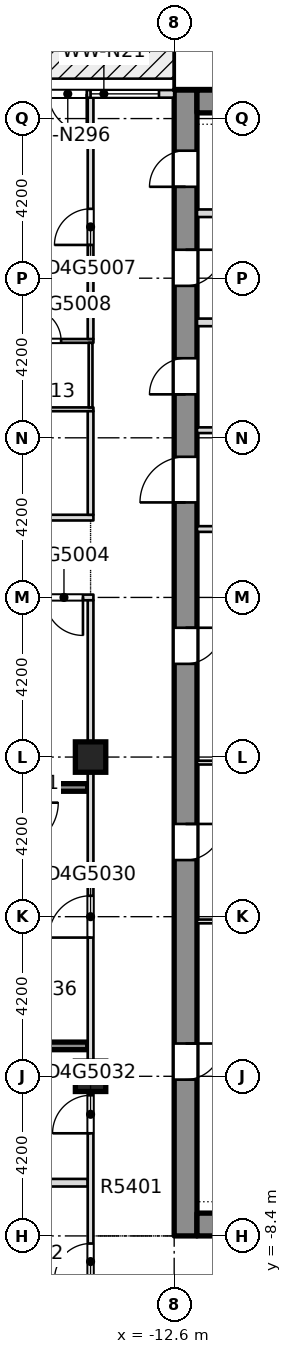
"""IFC4 building model, lengths in metres.
Left out: names, types, materials, properties, quantities, classifications, styles, units other than length and angle.
Written with IfcOpenShell. Run it as: python <this file> out.ifc"""

import sys

from ifc_helpers import new_model, si_unit, direction, frame, frame_2d, origin, origin_2d, place, context, subcontext, project, spatial, rectangle, extrude, element, fill, save


model = new_model("IFC4")
c1 = context("Model", 3, precision=1e-05, world=origin(), true_north=direction((0.0, 1.0)))
c2 = subcontext(c1, "Body", "Model", "MODEL_VIEW")
j1 = project(units=[si_unit("LENGTHUNIT", "METRE"), si_unit("PLANEANGLEUNIT", "RADIAN")], contexts=[c1])
p1 = place(None, origin())
s1 = spatial("IfcSite", under=j1, at=p1, CompositionType="ELEMENT")
p2 = place(p1, origin())
s2 = spatial("IfcBuilding", under=s1, at=p2, CompositionType="ELEMENT")
p3 = place(p2, frame((0.0, 0.0, 206.6)))
s3 = spatial("IfcBuildingStorey", under=s2, at=p3, CompositionType="ELEMENT", Elevation=206.6)
p4 = place(p3, frame((-12.3, -8.4, -0.4), z_axis=(0.0, 0.0, 1.0), x_axis=(0.0, 1.0, 0.0)))
e1 = element("IfcWall", 1, at=p4, inside=s3, PredefinedType="SHEAR", context=c2, shape_type="SweptSolid", body=[
    extrude(rectangle(XDim=30.15, YDim=0.6, at=frame_2d((15.075, 0.0))), origin(), (0.0, 0.0, 1.0), 3.45),
])
p5 = place(p4, frame((4.113, 0.0, 0.4)))
e2 = element("IfcOpeningElement", 2, at=p5, cuts=e1, PredefinedType="OPENING", context=c2, shape_type="SweptSolid", body=[
    extrude(rectangle(XDim=0.95, YDim=2.1, at=frame_2d((0.475, 1.05))), frame((0.0, 0.31, 0.0), z_axis=(0.0, -1.0, 0.0), x_axis=(1.0, 0.0, 0.0)), (0.0, 0.0, 1.0), 0.62),
])
p6 = place(p4, frame((9.89, 0.0, 0.4)))
e3 = element("IfcOpeningElement", 3, at=p6, cuts=e1, PredefinedType="OPENING", context=c2, shape_type="SweptSolid", body=[
    extrude(rectangle(XDim=0.95, YDim=2.1, at=frame_2d((0.475, 1.05))), frame((0.0, 0.31, 0.0), z_axis=(0.0, -1.0, 0.0), x_axis=(1.0, 0.0, 0.0)), (0.0, 0.0, 1.0), 0.62),
])
p7 = place(p4, frame((15.052, 0.0, 0.4)))
e4 = element("IfcOpeningElement", 4, at=p7, cuts=e1, PredefinedType="OPENING", context=c2, shape_type="SweptSolid", body=[
    extrude(rectangle(XDim=0.95, YDim=2.1, at=frame_2d((0.475, 1.05))), frame((0.0, 0.31, 0.0), z_axis=(0.0, -1.0, 0.0), x_axis=(1.0, 0.0, 0.0)), (0.0, 0.0, 1.0), 0.62),
])
p8 = place(p4, frame((22.144, 0.0, 0.4)))
e5 = element("IfcOpeningElement", 5, at=p8, cuts=e1, PredefinedType="OPENING", context=c2, shape_type="SweptSolid", body=[
    extrude(rectangle(XDim=0.95, YDim=2.1, at=frame_2d((0.475, 1.05))), frame((0.0, 0.31, 0.0), z_axis=(0.0, -1.0, 0.0), x_axis=(1.0, 0.0, 0.0)), (0.0, 0.0, 1.0), 0.62),
])
p9 = place(p4, frame((24.998, 0.0, 0.4)))
e6 = element("IfcOpeningElement", 6, at=p9, cuts=e1, PredefinedType="OPENING", context=c2, shape_type="SweptSolid", body=[
    extrude(rectangle(XDim=0.95, YDim=2.1, at=frame_2d((0.475, 1.05))), frame((0.0, 0.31, 0.0), z_axis=(0.0, -1.0, 0.0), x_axis=(1.0, 0.0, 0.0)), (0.0, 0.0, 1.0), 0.62),
])
p10 = place(p4, frame((27.605, 0.0, 0.4)))
e7 = element("IfcOpeningElement", 7, at=p10, cuts=e1, PredefinedType="OPENING", context=c2, shape_type="SweptSolid", body=[
    extrude(rectangle(XDim=0.95, YDim=2.1, at=frame_2d((0.475, 1.05))), frame((0.0, 0.31, 0.0), z_axis=(0.0, -1.0, 0.0), x_axis=(1.0, 0.0, 0.0)), (0.0, 0.0, 1.0), 0.62),
])
p11 = place(p4, frame((19.3, 0.0, 0.4)))
e8 = element("IfcOpeningElement", 8, at=p11, cuts=e1, PredefinedType="OPENING", context=c2, shape_type="SweptSolid", body=[
    extrude(rectangle(XDim=1.2, YDim=2.1, at=frame_2d((0.6, 1.05))), frame((0.0, 0.31, 0.0), z_axis=(0.0, -1.0, 0.0), x_axis=(1.0, 0.0, 0.0)), (0.0, 0.0, 1.0), 0.62),
])
p12 = place(p3, frame((-12.0, -8.1, -0.4), z_axis=(0.0, 0.0, 1.0), x_axis=(1.0, 0.0, 0.0)))
e9 = element("IfcWall", 9, at=p12, inside=s3, PredefinedType="SHEAR", context=c2, shape_type="SweptSolid", body=[
    extrude(rectangle(XDim=24.0, YDim=0.6, at=frame_2d((12.0, 0.0))), origin(), (0.0, 0.0, 1.0), 3.45),
])
p13 = place(p12, frame((7.25, 0.0, 0.4)))
e10 = element("IfcOpeningElement", 10, at=p13, cuts=e9, PredefinedType="OPENING", context=c2, shape_type="SweptSolid", body=[
    extrude(rectangle(XDim=1.8, YDim=2.1, at=frame_2d((0.9, 1.05))), frame((0.0, 0.31, 0.0), z_axis=(0.0, -1.0, 0.0), x_axis=(1.0, 0.0, 0.0)), (0.0, 0.0, 1.0), 0.62),
])
p14 = place(p12, frame((14.95, 0.0, 0.4)))
e11 = element("IfcOpeningElement", 11, at=p14, cuts=e9, PredefinedType="OPENING", context=c2, shape_type="SweptSolid", body=[
    extrude(rectangle(XDim=1.8, YDim=2.1, at=frame_2d((0.9, 1.05))), frame((0.0, 0.31, 0.0), z_axis=(0.0, -1.0, 0.0), x_axis=(1.0, 0.0, 0.0)), (0.0, 0.0, 1.0), 0.62),
])
p15 = place(p3, frame((-12.0, 21.45, -0.4), z_axis=(0.0, 0.0, 1.0), x_axis=(1.0, 0.0, 0.0)))
e12 = element("IfcWall", 12, at=p15, inside=s3, PredefinedType="SHEAR", context=c2, shape_type="SweptSolid", body=[
    extrude(rectangle(XDim=24.0, YDim=0.6, at=frame_2d((12.0, 0.0))), origin(), (0.0, 0.0, 1.0), 3.45),
])
for number, where, z_axis, x_axis in (
    (13, (-14.8, -4.2, -0.4), (0.0, 0.0, 1.0), (1.0, 0.0, 0.0)),
    (14, (-14.8, 4.2, -0.4), (0.0, 0.0, 1.0), (1.0, 0.0, 0.0)),
):
    element("IfcColumn", number, at=place(p3, frame(where, z_axis=z_axis, x_axis=x_axis)), inside=s3, PredefinedType="COLUMN", context=c2, shape_type="SweptSolid", body=[
        extrude(rectangle(XDim=0.8, YDim=0.8, at=origin_2d()), origin(), (0.0, 0.0, 1.0), 3.45),
    ])
p16 = place(p3, frame((-25.75, -7.0, 0.0), z_axis=(0.0, 0.0, 1.0), x_axis=(1.0, 0.0, 0.0)))
e15 = element("IfcWall", 15, at=p16, inside=s3, PredefinedType="PARTITIONING", context=c2, shape_type="SweptSolid", body=[
    extrude(rectangle(XDim=10.875, YDim=0.2, at=frame_2d((5.438, 0.0))), origin(), (0.0, 0.0, 1.0), 3.05),
])
p17 = place(p3, frame((-22.4, -3.4, 0.0), z_axis=(0.0, 0.0, 1.0), x_axis=(1.0, 0.0, 0.0)))
e16 = element("IfcWall", 16, at=p17, inside=s3, PredefinedType="SOLIDWALL", context=c2, shape_type="SweptSolid", body=[
    extrude(rectangle(XDim=7.525, YDim=0.2, at=frame_2d((3.762, 0.0))), origin(), (0.0, 0.0, 1.0), 3.05),
])
p18 = place(p3, frame((-20.45, 3.4, 0.0), z_axis=(0.0, 0.0, 1.0), x_axis=(1.0, 0.0, 0.0)))
e17 = element("IfcWall", 17, at=p18, inside=s3, PredefinedType="SOLIDWALL", context=c2, shape_type="SweptSolid", body=[
    extrude(rectangle(XDim=5.575, YDim=0.2, at=frame_2d((2.788, 0.0))), origin(), (0.0, 0.0, 1.0), 3.05),
])
p19 = place(p3, frame((-25.75, 8.4, 0.0), z_axis=(0.0, 0.0, 1.0), x_axis=(1.0, 0.0, 0.0)))
e18 = element("IfcWall", 18, at=p19, inside=s3, PredefinedType="PARTITIONING", context=c2, shape_type="SweptSolid", body=[
    extrude(rectangle(XDim=11.025, YDim=0.15, at=frame_2d((5.512, 0.0))), origin(), (0.0, 0.0, 1.0), 3.05),
])
p20 = place(p19, frame((9.75, 0.0, 0.0)))
e19 = element("IfcOpeningElement", 19, at=p20, cuts=e18, PredefinedType="OPENING", context=c2, shape_type="SweptSolid", body=[
    extrude(rectangle(XDim=1.0, YDim=2.1, at=frame_2d((0.5, 1.05))), frame((0.0, 0.085, 0.0), z_axis=(0.0, -1.0, 0.0), x_axis=(1.0, 0.0, 0.0)), (0.0, 0.0, 1.0), 0.17),
])
p21 = place(p3, frame((-25.75, 10.5, 0.0), z_axis=(0.0, 0.0, 1.0), x_axis=(1.0, 0.0, 0.0)))
e20 = element("IfcWall", 20, at=p21, inside=s3, PredefinedType="PARTITIONING", context=c2, shape_type="SweptSolid", body=[
    extrude(rectangle(XDim=11.025, YDim=0.15, at=frame_2d((5.512, 0.0))), origin(), (0.0, 0.0, 1.0), 3.05),
])
p22 = place(p21, frame((4.875, 0.0, 0.0)))
e21 = element("IfcOpeningElement", 21, at=p22, cuts=e20, PredefinedType="OPENING", context=c2, shape_type="SweptSolid", body=[
    extrude(rectangle(XDim=1.0, YDim=2.1, at=frame_2d((0.5, 1.05))), frame((0.0, 0.085, 0.0), z_axis=(0.0, -1.0, 0.0), x_axis=(1.0, 0.0, 0.0)), (0.0, 0.0, 1.0), 0.17),
])
p23 = place(p3, frame((-17.25, 13.35, 0.0), z_axis=(0.0, 0.0, 1.0), x_axis=(1.0, 0.0, 0.0)))
e22 = element("IfcWall", 22, at=p23, inside=s3, PredefinedType="PARTITIONING", context=c2, shape_type="SweptSolid", body=[
    extrude(rectangle(XDim=2.525, YDim=0.1, at=frame_2d((1.262, 0.0))), origin(), (0.0, 0.0, 1.0), 3.05),
])
p24 = place(p3, frame((-17.25, 15.15, 0.0), z_axis=(0.0, 0.0, 1.0), x_axis=(1.0, 0.0, 0.0)))
e23 = element("IfcWall", 23, at=p24, inside=s3, PredefinedType="PARTITIONING", context=c2, shape_type="SweptSolid", body=[
    extrude(rectangle(XDim=2.525, YDim=0.1, at=frame_2d((1.262, 0.0))), origin(), (0.0, 0.0, 1.0), 3.05),
])
p25 = place(p24, frame((0.825, 0.0, 0.0)))
e24 = element("IfcOpeningElement", 24, at=p25, cuts=e23, PredefinedType="OPENING", context=c2, shape_type="SweptSolid", body=[
    extrude(rectangle(XDim=0.85, YDim=2.1, at=frame_2d((0.425, 1.05))), frame((0.0, 0.06, 0.0), z_axis=(0.0, -1.0, 0.0), x_axis=(1.0, 0.0, 0.0)), (0.0, 0.0, 1.0), 0.12),
])
p26 = place(p3, frame((-14.8, -9.77, 0.0), z_axis=(0.0, 0.0, 1.0), x_axis=(0.0, 1.0, 0.0)))
e25 = element("IfcWall", 25, at=p26, inside=s3, PredefinedType="PARTITIONING", context=c2, shape_type="SweptSolid", body=[
    extrude(rectangle(XDim=18.095, YDim=0.15, at=frame_2d((9.047, 0.0))), origin(), (0.0, 0.0, 1.0), 3.05),
])
p27 = place(p26, frame((0.22, 0.0, 0.0)))
e26 = element("IfcOpeningElement", 26, at=p27, cuts=e25, PredefinedType="OPENING", context=c2, shape_type="SweptSolid", body=[
    extrude(rectangle(XDim=0.95, YDim=2.1, at=frame_2d((0.475, 1.05))), frame((0.0, 0.085, 0.0), z_axis=(0.0, -1.0, 0.0), x_axis=(1.0, 0.0, 0.0)), (0.0, 0.0, 1.0), 0.17),
])
p28 = place(p26, frame((9.22, 0.0, 0.0)))
e27 = element("IfcOpeningElement", 27, at=p28, cuts=e25, PredefinedType="OPENING", context=c2, shape_type="SweptSolid", body=[
    extrude(rectangle(XDim=1.1, YDim=2.1, at=frame_2d((0.55, 1.05))), frame((0.0, 0.085, 0.0), z_axis=(0.0, -1.0, 0.0), x_axis=(1.0, 0.0, 0.0)), (0.0, 0.0, 1.0), 0.17),
])
p29 = place(p26, frame((4.07, 0.0, 0.0)))
e28 = element("IfcOpeningElement", 28, at=p29, cuts=e25, PredefinedType="OPENING", context=c2, shape_type="SweptSolid", body=[
    extrude(rectangle(XDim=1.0, YDim=2.1, at=frame_2d((0.5, 1.05))), frame((0.0, 0.085, 0.0), z_axis=(0.0, -1.0, 0.0), x_axis=(1.0, 0.0, 0.0)), (0.0, 0.0, 1.0), 0.17),
])
p30 = place(p3, frame((-14.8, 10.575, 0.0), z_axis=(0.0, 0.0, 1.0), x_axis=(0.0, 1.0, 0.0)))
e29 = element("IfcWall", 29, at=p30, inside=s3, PredefinedType="PARTITIONING", context=c2, shape_type="SweptSolid", body=[
    extrude(rectangle(XDim=2.725, YDim=0.15, at=frame_2d((1.363, 0.0))), origin(), (0.0, 0.0, 1.0), 3.05),
])
p31 = place(p3, frame((-14.8, 13.4, 0.0), z_axis=(0.0, 0.0, 1.0), x_axis=(0.0, 1.0, 0.0)))
e30 = element("IfcWall", 30, at=p31, inside=s3, PredefinedType="PARTITIONING", context=c2, shape_type="SweptSolid", body=[
    extrude(rectangle(XDim=1.7, YDim=0.1, at=frame_2d((0.85, 0.0))), origin(), (0.0, 0.0, 1.0), 3.05),
])
p32 = place(p3, frame((-14.8, 15.2, 0.0), z_axis=(0.0, 0.0, 1.0), x_axis=(0.0, 1.0, 0.0)))
e31 = element("IfcWall", 31, at=p32, inside=s3, PredefinedType="PARTITIONING", context=c2, shape_type="SweptSolid", body=[
    extrude(rectangle(XDim=6.35, YDim=0.15, at=frame_2d((3.175, 0.0))), origin(), (0.0, 0.0, 1.0), 3.05),
])
p33 = place(p32, frame((2.475, 0.0, 0.0)))
e32 = element("IfcOpeningElement", 32, at=p33, cuts=e31, PredefinedType="OPENING", context=c2, shape_type="SweptSolid", body=[
    extrude(rectangle(XDim=0.95, YDim=2.1, at=frame_2d((0.475, 1.05))), frame((0.0, 0.085, 0.0), z_axis=(0.0, -1.0, 0.0), x_axis=(1.0, 0.0, 0.0)), (0.0, 0.0, 1.0), 0.17),
])
p34 = place(p3, frame((-12.6, 21.65, 0.0), z_axis=(0.0, 0.0, 1.0), x_axis=(-1.0, 0.0, 0.0)))
e33 = element("IfcWall", 33, at=p34, inside=s3, PredefinedType="STANDARD", context=c2, shape_type="SweptSolid", body=[
    extrude(rectangle(XDim=3.7, YDim=0.2, at=frame_2d((1.85, 0.0))), origin(), (0.0, 0.0, 1.0), 3.05),
])
p35 = place(p34, frame((0.4, 0.0, 0.2)))
e34 = element("IfcOpeningElement", 34, at=p35, cuts=e33, PredefinedType="OPENING", context=c2, shape_type="SweptSolid", body=[
    extrude(rectangle(XDim=1.8, YDim=2.65, at=frame_2d((0.9, 1.325))), frame((0.0, 0.11, 0.0), z_axis=(0.0, -1.0, 0.0), x_axis=(1.0, 0.0, 0.0)), (0.0, 0.0, 1.0), 0.22),
])
p36 = place(p34, frame((2.3, 0.0, 0.0)))
e35 = element("IfcOpeningElement", 35, at=p36, cuts=e33, PredefinedType="OPENING", context=c2, shape_type="SweptSolid", body=[
    extrude(rectangle(XDim=1.0, YDim=2.4, at=frame_2d((0.5, 1.2))), frame((0.0, 0.11, 0.0), z_axis=(0.0, -1.0, 0.0), x_axis=(1.0, 0.0, 0.0)), (0.0, 0.0, 1.0), 0.22),
])
for number, where, z_axis, x_axis in (
    (36, (-11.999, -0.125, 0.0), (0.0, 0.0, 1.0), (1.0, 0.0, 0.0)),
    (37, (-11.999, 4.054, 0.0), (0.0, 0.0, 1.0), (1.0, 0.0, 0.0)),
):
    element("IfcWall", number, at=place(p3, frame(where, z_axis=z_axis, x_axis=x_axis)), inside=s3, PredefinedType="PARTITIONING", context=c2, shape_type="SweptSolid", body=[
        extrude(rectangle(XDim=3.298, YDim=0.1, at=frame_2d((1.649, 0.0))), origin(), (0.0, 0.0, 1.0), 3.05),
    ])
for number, where, z_axis, x_axis in (
    (38, (-11.999, 10.2, 0.0), (0.0, 0.0, 1.0), (1.0, 0.0, 0.0)),
    (39, (-11.999, 12.8, 0.0), (0.0, 0.0, 1.0), (1.0, 0.0, 0.0)),
):
    element("IfcWall", number, at=place(p3, frame(where, z_axis=z_axis, x_axis=x_axis)), inside=s3, PredefinedType="PARTITIONING", context=c2, shape_type="SweptSolid", body=[
        extrude(rectangle(XDim=3.298, YDim=0.15, at=frame_2d((1.649, 0.0))), origin(), (0.0, 0.0, 1.0), 3.05),
    ])
for number, where, z_axis, x_axis in (
    (40, (-11.999, 15.637, 0.0), (0.0, 0.0, 1.0), (1.0, 0.0, 0.0)),
    (41, (-11.999, 18.509, 0.0), (0.0, 0.0, 1.0), (1.0, 0.0, 0.0)),
):
    element("IfcWall", number, at=place(p3, frame(where, z_axis=z_axis, x_axis=x_axis)), inside=s3, PredefinedType="PARTITIONING", context=c2, shape_type="SweptSolid", body=[
        extrude(rectangle(XDim=3.298, YDim=0.2, at=frame_2d((1.649, 0.0))), origin(), (0.0, 0.0, 1.0), 3.05),
    ])
p37 = place(p27, origin())
e42 = element("IfcDoor", 42, at=p37, inside=s3, OperationType="SINGLE_SWING_LEFT", PredefinedType="DOOR", context=c2, shape_type="SweptSolid", body=[
    extrude(rectangle(XDim=0.95, YDim=2.1, at=frame_2d((0.475, 1.05))), frame((0.0, 0.025, 0.0), z_axis=(0.0, -1.0, 0.0), x_axis=(1.0, 0.0, 0.0)), (0.0, 0.0, 1.0), 0.05),
])
fill(e26, e42)
p38 = place(p20, origin())
e43 = element("IfcDoor", 43, at=p38, inside=s3, OperationType="SINGLE_SWING_RIGHT", PredefinedType="DOOR", context=c2, shape_type="SweptSolid", body=[
    extrude(rectangle(XDim=1.0, YDim=2.1, at=frame_2d((0.5, 1.05))), frame((0.0, 0.025, 0.0), z_axis=(0.0, -1.0, 0.0), x_axis=(1.0, 0.0, 0.0)), (0.0, 0.0, 1.0), 0.05),
])
fill(e19, e43)
p39 = place(p33, origin())
e44 = element("IfcDoor", 44, at=p39, inside=s3, OperationType="SINGLE_SWING_RIGHT", PredefinedType="DOOR", context=c2, shape_type="SweptSolid", body=[
    extrude(rectangle(XDim=0.95, YDim=2.1, at=frame_2d((0.475, 1.05))), frame((0.0, 0.025, 0.0), z_axis=(0.0, -1.0, 0.0), x_axis=(1.0, 0.0, 0.0)), (0.0, 0.0, 1.0), 0.05),
])
fill(e32, e44)
p40 = place(p25, origin())
e45 = element("IfcDoor", 45, at=p40, inside=s3, OperationType="SINGLE_SWING_RIGHT", PredefinedType="DOOR", context=c2, shape_type="SweptSolid", body=[
    extrude(rectangle(XDim=0.85, YDim=2.1, at=frame_2d((0.425, 1.05))), frame((0.0, 0.025, 0.0), z_axis=(0.0, -1.0, 0.0), x_axis=(1.0, 0.0, 0.0)), (0.0, 0.0, 1.0), 0.05),
])
fill(e24, e45)
p41 = place(p28, origin())
e46 = element("IfcDoor", 46, at=p41, inside=s3, OperationType="SINGLE_SWING_RIGHT", PredefinedType="DOOR", context=c2, shape_type="SweptSolid", body=[
    extrude(rectangle(XDim=1.1, YDim=2.1, at=frame_2d((0.55, 1.05))), frame((0.0, 0.025, 0.0), z_axis=(0.0, -1.0, 0.0), x_axis=(1.0, 0.0, 0.0)), (0.0, 0.0, 1.0), 0.05),
])
fill(e27, e46)
p42 = place(p29, origin())
e47 = element("IfcDoor", 47, at=p42, inside=s3, OperationType="SINGLE_SWING_LEFT", PredefinedType="DOOR", context=c2, shape_type="SweptSolid", body=[
    extrude(rectangle(XDim=1.0, YDim=2.1, at=frame_2d((0.5, 1.05))), frame((0.0, 0.025, 0.0), z_axis=(0.0, -1.0, 0.0), x_axis=(1.0, 0.0, 0.0)), (0.0, 0.0, 1.0), 0.05),
])
fill(e28, e47)
p43 = place(p35, origin())
e48 = element("IfcWindow", 48, at=p43, inside=s3, PartitioningType="SINGLE_PANEL", PredefinedType="WINDOW", context=c2, shape_type="SweptSolid", body=[
    extrude(rectangle(XDim=1.8, YDim=2.65, at=frame_2d((0.9, 1.325))), frame((0.0, 0.03, 0.0), z_axis=(0.0, -1.0, 0.0), x_axis=(1.0, 0.0, 0.0)), (0.0, 0.0, 1.0), 0.06),
])
fill(e34, e48)
p44 = place(p36, origin())
e49 = element("IfcDoor", 49, at=p44, inside=s3, OperationType="SINGLE_SWING_LEFT", PredefinedType="DOOR", context=c2, shape_type="SweptSolid", body=[
    extrude(rectangle(XDim=1.0, YDim=2.4, at=frame_2d((0.5, 1.2))), frame((0.0, 0.025, 0.0), z_axis=(0.0, -1.0, 0.0), x_axis=(1.0, 0.0, 0.0)), (0.0, 0.0, 1.0), 0.05),
])
fill(e35, e49)
p45 = place(p5, origin())
e50 = element("IfcDoor", 50, at=p45, inside=s3, OperationType="SINGLE_SWING_LEFT", PredefinedType="DOOR", context=c2, shape_type="SweptSolid", body=[
    extrude(rectangle(XDim=0.95, YDim=2.1, at=frame_2d((0.475, 1.05))), frame((0.0, 0.025, 0.0), z_axis=(0.0, -1.0, 0.0), x_axis=(1.0, 0.0, 0.0)), (0.0, 0.0, 1.0), 0.05),
])
fill(e2, e50)
p46 = place(p6, origin())
e51 = element("IfcDoor", 51, at=p46, inside=s3, OperationType="SINGLE_SWING_LEFT", PredefinedType="DOOR", context=c2, shape_type="SweptSolid", body=[
    extrude(rectangle(XDim=0.95, YDim=2.1, at=frame_2d((0.475, 1.05))), frame((0.0, 0.025, 0.0), z_axis=(0.0, -1.0, 0.0), x_axis=(1.0, 0.0, 0.0)), (0.0, 0.0, 1.0), 0.05),
])
fill(e3, e51)
p47 = place(p7, origin())
e52 = element("IfcDoor", 52, at=p47, inside=s3, OperationType="SINGLE_SWING_LEFT", PredefinedType="DOOR", context=c2, shape_type="SweptSolid", body=[
    extrude(rectangle(XDim=0.95, YDim=2.1, at=frame_2d((0.475, 1.05))), frame((0.0, 0.025, 0.0), z_axis=(0.0, -1.0, 0.0), x_axis=(1.0, 0.0, 0.0)), (0.0, 0.0, 1.0), 0.05),
])
fill(e4, e52)
p48 = place(p8, origin())
e53 = element("IfcDoor", 53, at=p48, inside=s3, OperationType="SINGLE_SWING_LEFT", PredefinedType="DOOR", context=c2, shape_type="SweptSolid", body=[
    extrude(rectangle(XDim=0.95, YDim=2.1, at=frame_2d((0.475, 1.05))), frame((0.0, 0.025, 0.0), z_axis=(0.0, -1.0, 0.0), x_axis=(1.0, 0.0, 0.0)), (0.0, 0.0, 1.0), 0.05),
])
fill(e5, e53)
p49 = place(p9, origin())
e54 = element("IfcDoor", 54, at=p49, inside=s3, OperationType="SINGLE_SWING_LEFT", PredefinedType="DOOR", context=c2, shape_type="SweptSolid", body=[
    extrude(rectangle(XDim=0.95, YDim=2.1, at=frame_2d((0.475, 1.05))), frame((0.0, 0.025, 0.0), z_axis=(0.0, -1.0, 0.0), x_axis=(1.0, 0.0, 0.0)), (0.0, 0.0, 1.0), 0.05),
])
fill(e6, e54)
p50 = place(p10, origin())
e55 = element("IfcDoor", 55, at=p50, inside=s3, OperationType="SINGLE_SWING_LEFT", PredefinedType="DOOR", context=c2, shape_type="SweptSolid", body=[
    extrude(rectangle(XDim=0.95, YDim=2.1, at=frame_2d((0.475, 1.05))), frame((0.0, 0.025, 0.0), z_axis=(0.0, -1.0, 0.0), x_axis=(1.0, 0.0, 0.0)), (0.0, 0.0, 1.0), 0.05),
])
fill(e7, e55)
p51 = place(p11, origin())
e56 = element("IfcDoor", 56, at=p51, inside=s3, OperationType="SINGLE_SWING_LEFT", PredefinedType="DOOR", context=c2, shape_type="SweptSolid", body=[
    extrude(rectangle(XDim=1.2, YDim=2.1, at=frame_2d((0.6, 1.05))), frame((0.0, 0.025, 0.0), z_axis=(0.0, -1.0, 0.0), x_axis=(1.0, 0.0, 0.0)), (0.0, 0.0, 1.0), 0.05),
])
fill(e8, e56)
save(model, sys.argv[1])
